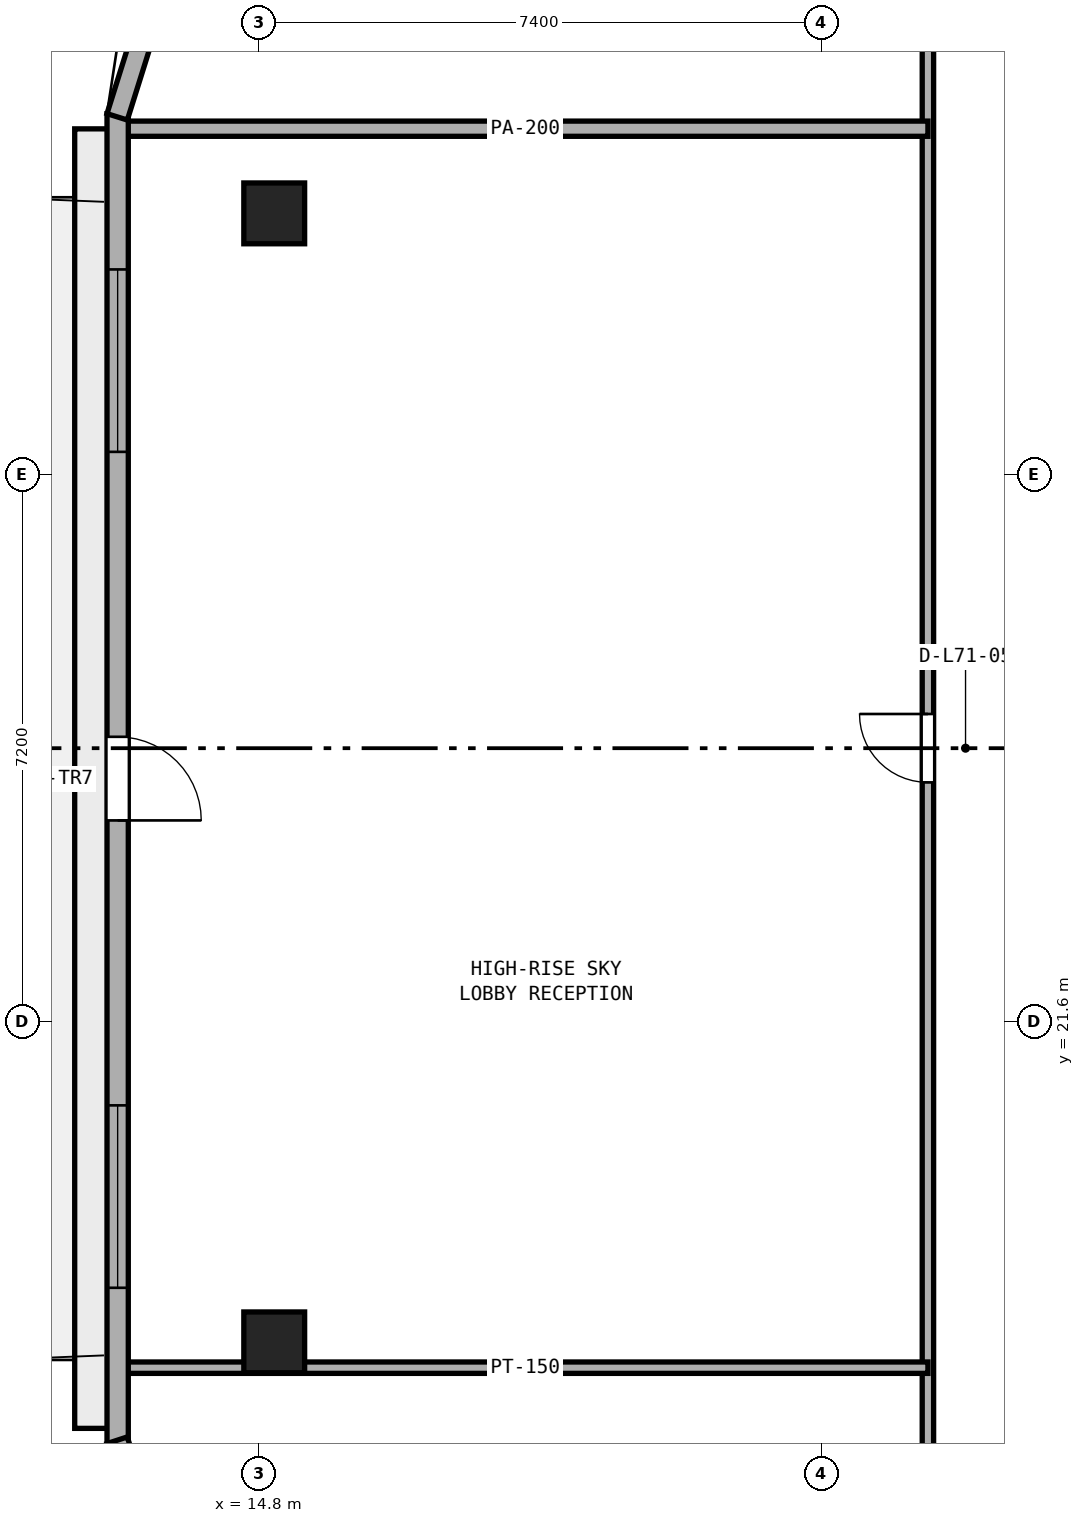
"""IFC4 building model, lengths in metres.
Left out: names, types, materials, properties, quantities, classifications, styles, units other than length and angle.
Written with IfcOpenShell. Run it as: python <this file> out.ifc"""

import sys

from ifc_helpers import new_model, si_unit, direction, frame, frame_2d, origin, origin_2d, place, context, subcontext, project, spatial, rectangle, extrude, element, fill, save


model = new_model("IFC4")
c1 = context("Model", 3, precision=1e-05, world=origin(), true_north=direction((0.0, 1.0)))
c2 = subcontext(c1, "Body", "Model", "MODEL_VIEW")
j1 = project(units=[si_unit("LENGTHUNIT", "METRE"), si_unit("PLANEANGLEUNIT", "RADIAN")], contexts=[c1])
p1 = place(None, origin())
s1 = spatial("IfcSite", under=j1, at=p1, CompositionType="ELEMENT")
p2 = place(p1, origin())
s2 = spatial("IfcBuilding", under=s1, at=p2, CompositionType="ELEMENT")
p3 = place(p2, frame((0.0, 0.0, 278.2)))
s3 = spatial("IfcBuildingStorey", under=s2, at=p3, CompositionType="ELEMENT", Elevation=278.2)
for number, where, z_axis, x_axis in (
    (1, (15.0, 32.236, 0.0), (0.0, 0.0, 1.0), (1.0, 0.0, 0.0)),
    (2, (15.0, 17.383, 0.0), (0.0, 0.0, 1.0), (1.0, 0.0, 0.0)),
):
    element("IfcColumn", number, at=place(p3, frame(where, z_axis=z_axis, x_axis=x_axis)), inside=s3, PredefinedType="COLUMN", context=c2, shape_type="SweptSolid", body=[
        extrude(rectangle(XDim=0.8, YDim=0.8, at=origin_2d()), origin(), (0.0, 0.0, 1.0), 3.8),
    ])
p4 = place(p3, frame((23.6, 15.2, 0.0), z_axis=(0.0, 0.0, 1.0), x_axis=(0.0, 1.0, 0.0)))
e3 = element("IfcWall", 3, at=p4, inside=s3, PredefinedType="PARTITIONING", context=c2, shape_type="SweptSolid", body=[
    extrude(rectangle(XDim=20.0, YDim=0.15, at=frame_2d((10.0, 0.0))), origin(), (0.0, 0.0, 1.0), 3.54),
])
p5 = place(p4, frame((9.55, 0.0, 0.0)))
e4 = element("IfcOpeningElement", 4, at=p5, cuts=e3, PredefinedType="OPENING", context=c2, shape_type="SweptSolid", body=[
    extrude(rectangle(XDim=0.9, YDim=2.1, at=frame_2d((0.45, 1.05))), frame((0.0, 0.085, 0.0), z_axis=(0.0, -1.0, 0.0), x_axis=(1.0, 0.0, 0.0)), (0.0, 0.0, 1.0), 0.17),
])
p6 = place(p3, frame((13.005, 17.05, 0.0), z_axis=(0.0, 0.0, 1.0), x_axis=(1.0, 0.0, 0.0)))
e5 = element("IfcWall", 5, at=p6, inside=s3, PredefinedType="PARTITIONING", context=c2, shape_type="SweptSolid", body=[
    extrude(rectangle(XDim=10.595, YDim=0.15, at=frame_2d((5.298, 0.0))), origin(), (0.0, 0.0, 1.0), 3.54),
])
p7 = place(p3, frame((13.005, 33.35, 0.0), z_axis=(0.0, 0.0, 1.0), x_axis=(1.0, 0.0, 0.0)))
e6 = element("IfcWall", 6, at=p7, inside=s3, PredefinedType="PARTITIONING", context=c2, shape_type="SweptSolid", body=[
    extrude(rectangle(XDim=10.595, YDim=0.2, at=frame_2d((5.298, 0.0))), origin(), (0.0, 0.0, 1.0), 3.54),
])
p8 = place(p3, frame((12.94, 33.548, 0.0), z_axis=(0.0, 0.0, 1.0), x_axis=(0.0, -1.0, 0.0)))
e7 = element("IfcWall", 7, at=p8, inside=s3, PredefinedType="STANDARD", context=c2, shape_type="SweptSolid", body=[
    extrude(rectangle(XDim=17.496, YDim=0.28, at=frame_2d((8.748, 0.0))), origin(), (0.0, 0.0, 1.0), 3.54),
])
p9 = place(p8, frame((8.198, 0.0, 0.0)))
e8 = element("IfcOpeningElement", 8, at=p9, cuts=e7, PredefinedType="OPENING", context=c2, shape_type="SweptSolid", body=[
    extrude(rectangle(XDim=1.1, YDim=2.2, at=frame_2d((0.55, 1.1))), frame((0.0, 0.15, 0.0), z_axis=(0.0, -1.0, 0.0), x_axis=(1.0, 0.0, 0.0)), (0.0, 0.0, 1.0), 0.3),
])
p10 = place(p8, frame((2.049, 0.0, 0.9)))
e9 = element("IfcOpeningElement", 9, at=p10, cuts=e7, PredefinedType="OPENING", context=c2, shape_type="SweptSolid", body=[
    extrude(rectangle(XDim=2.4, YDim=1.75, at=frame_2d((1.2, 0.875))), frame((0.0, 0.15, 0.0), z_axis=(0.0, -1.0, 0.0), x_axis=(1.0, 0.0, 0.0)), (0.0, 0.0, 1.0), 0.3),
])
p11 = place(p8, frame((13.047, 0.0, 0.9)))
e10 = element("IfcOpeningElement", 10, at=p11, cuts=e7, PredefinedType="OPENING", context=c2, shape_type="SweptSolid", body=[
    extrude(rectangle(XDim=2.4, YDim=1.75, at=frame_2d((1.2, 0.875))), frame((0.0, 0.15, 0.0), z_axis=(0.0, -1.0, 0.0), x_axis=(1.0, 0.0, 0.0)), (0.0, 0.0, 1.0), 0.3),
])
p12 = place(p3, frame((13.615, 35.677, 0.0), z_axis=(0.0, 0.0, 1.0), x_axis=(-0.299374552426, -0.954135670311, 0.0)))
e11 = element("IfcWall", 11, at=p12, inside=s3, PredefinedType="STANDARD", context=c2, shape_type="SweptSolid", body=[
    extrude(rectangle(XDim=2.275, YDim=0.28, at=frame_2d((1.138, 0.0))), origin(), (0.0, 0.0, 1.0), 3.54),
])
p13 = place(p3, frame((12.933, 16.095, 0.0), z_axis=(0.0, 0.0, 1.0), x_axis=(0.3110492363, -0.950393798695, 0.0)))
e12 = element("IfcWall", 12, at=p13, inside=s3, PredefinedType="STANDARD", context=c2, shape_type="SweptSolid", body=[
    extrude(rectangle(XDim=2.364, YDim=0.28, at=frame_2d((1.182, 0.0))), origin(), (0.0, 0.0, 1.0), 3.54),
])
p14 = place(p5, origin())
e13 = element("IfcDoor", 13, at=p14, inside=s3, OperationType="SINGLE_SWING_RIGHT", PredefinedType="DOOR", context=c2, shape_type="SweptSolid", body=[
    extrude(rectangle(XDim=0.9, YDim=2.1, at=frame_2d((0.45, 1.05))), frame((0.0, 0.025, 0.0), z_axis=(0.0, -1.0, 0.0), x_axis=(1.0, 0.0, 0.0)), (0.0, 0.0, 1.0), 0.05),
])
fill(e4, e13)
p15 = place(p9, origin())
e14 = element("IfcDoor", 14, at=p15, inside=s3, OperationType="SINGLE_SWING_RIGHT", PredefinedType="DOOR", context=c2, shape_type="SweptSolid", body=[
    extrude(rectangle(XDim=1.1, YDim=2.2, at=frame_2d((0.55, 1.1))), frame((0.0, 0.025, 0.0), z_axis=(0.0, -1.0, 0.0), x_axis=(1.0, 0.0, 0.0)), (0.0, 0.0, 1.0), 0.05),
])
fill(e8, e14)
p16 = place(p10, origin())
e15 = element("IfcWindow", 15, at=p16, inside=s3, PartitioningType="SINGLE_PANEL", PredefinedType="WINDOW", context=c2, shape_type="SweptSolid", body=[
    extrude(rectangle(XDim=2.4, YDim=1.75, at=frame_2d((1.2, 0.875))), frame((0.0, 0.03, 0.0), z_axis=(0.0, -1.0, 0.0), x_axis=(1.0, 0.0, 0.0)), (0.0, 0.0, 1.0), 0.06),
])
fill(e9, e15)
p17 = place(p11, origin())
e16 = element("IfcWindow", 16, at=p17, inside=s3, PartitioningType="SINGLE_PANEL", PredefinedType="WINDOW", context=c2, shape_type="SweptSolid", body=[
    extrude(rectangle(XDim=2.4, YDim=1.75, at=frame_2d((1.2, 0.875))), frame((0.0, 0.03, 0.0), z_axis=(0.0, -1.0, 0.0), x_axis=(1.0, 0.0, 0.0)), (0.0, 0.0, 1.0), 0.06),
])
fill(e10, e16)
save(model, sys.argv[1])
